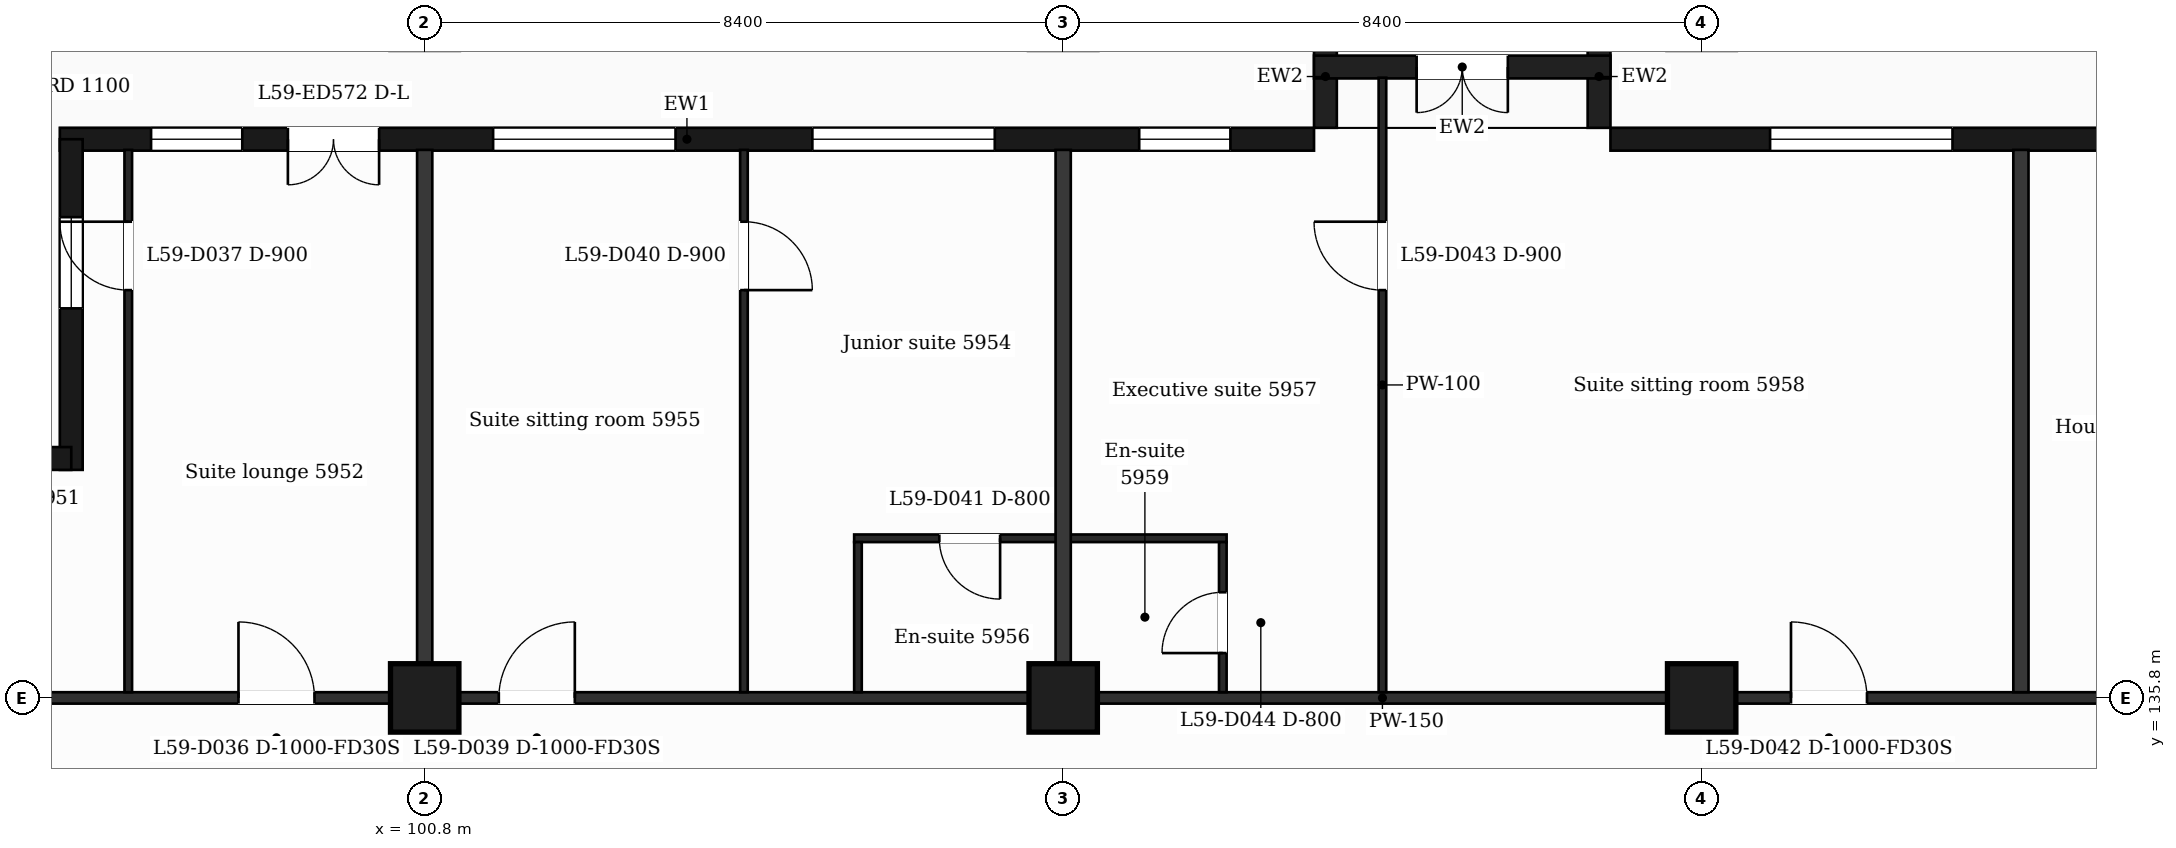
"""IFC4 building model, lengths in metres.
Left out: names, types, materials, properties, quantities, classifications, styles, units other than length and angle.
Written with IfcOpenShell. Run it as: python <this file> out.ifc"""

import sys

from ifc_helpers import new_model, si_unit, direction, frame, frame_2d, origin, origin_2d, place, context, subcontext, project, spatial, rectangle, extrude, element, fill, save


model = new_model("IFC4")
c1 = context("Model", 3, precision=1e-05, world=origin(), true_north=direction((0.0, 1.0)))
c2 = subcontext(c1, "Body", "Model", "MODEL_VIEW")
j1 = project(units=[si_unit("LENGTHUNIT", "METRE"), si_unit("PLANEANGLEUNIT", "RADIAN")], contexts=[c1])
p1 = place(None, origin())
s1 = spatial("IfcSite", under=j1, at=p1, CompositionType="ELEMENT")
p2 = place(p1, origin())
s2 = spatial("IfcBuilding", under=s1, at=p2, CompositionType="ELEMENT")
p3 = place(p2, frame((0.0, 0.0, 242.9)))
s3 = spatial("IfcBuildingStorey", under=s2, at=p3, CompositionType="ELEMENT", Elevation=242.9)
for number, where, z_axis, x_axis in (
    (1, (100.8, 135.8, 0.0), (0.0, 0.0, 1.0), (1.0, 0.0, 0.0)),
    (2, (109.2, 135.8, 0.0), (0.0, 0.0, 1.0), (1.0, 0.0, 0.0)),
    (3, (117.6, 135.8, 0.0), (0.0, 0.0, 1.0), (1.0, 0.0, 0.0)),
):
    element("IfcColumn", number, at=place(p3, frame(where, z_axis=z_axis, x_axis=x_axis)), inside=s3, PredefinedType="COLUMN", context=c2, shape_type="SweptSolid", body=[
        extrude(rectangle(XDim=0.9, YDim=0.9, at=origin_2d()), origin(), (0.0, 0.0, 1.0), 3.7),
    ])
p4 = place(p3, frame((130.65, 143.15, 0.0), z_axis=(0.0, 0.0, 1.0), x_axis=(-1.0, 0.0, 0.0)))
e4 = element("IfcWall", 4, at=p4, inside=s3, PredefinedType="SOLIDWALL", context=c2, shape_type="SweptSolid", body=[
    extrude(rectangle(XDim=14.25, YDim=0.3, at=frame_2d((7.125, 0.0))), origin(), (0.0, 0.0, 1.0), 3.2),
])
p5 = place(p4, frame((1.35, 0.0, 0.9)))
e5 = element("IfcOpeningElement", 5, at=p5, cuts=e4, PredefinedType="OPENING", context=c2, shape_type="SweptSolid", body=[
    extrude(rectangle(XDim=2.4, YDim=2.1, at=frame_2d((1.2, 1.05))), frame((0.0, 0.16, 0.0), z_axis=(0.0, -1.0, 0.0), x_axis=(1.0, 0.0, 0.0)), (0.0, 0.0, 1.0), 0.32),
])
p6 = place(p4, frame((6.15, 0.0, 0.0)))
e6 = element("IfcOpeningElement", 6, at=p6, cuts=e4, PredefinedType="OPENING", context=c2, shape_type="SweptSolid", body=[
    extrude(rectangle(XDim=1.2, YDim=2.4, at=frame_2d((0.6, 1.2))), frame((0.0, 0.16, 0.0), z_axis=(0.0, -1.0, 0.0), x_axis=(1.0, 0.0, 0.0)), (0.0, 0.0, 1.0), 0.32),
])
p7 = place(p4, frame((9.75, 0.0, 0.9)))
e7 = element("IfcOpeningElement", 7, at=p7, cuts=e4, PredefinedType="OPENING", context=c2, shape_type="SweptSolid", body=[
    extrude(rectangle(XDim=2.4, YDim=2.1, at=frame_2d((1.2, 1.05))), frame((0.0, 0.16, 0.0), z_axis=(0.0, -1.0, 0.0), x_axis=(1.0, 0.0, 0.0)), (0.0, 0.0, 1.0), 0.32),
])
p8 = place(p3, frame((112.5, 143.15, 0.0), z_axis=(0.0, 0.0, 1.0), x_axis=(-1.0, 0.0, 0.0)))
e8 = element("IfcWall", 8, at=p8, inside=s3, PredefinedType="SOLIDWALL", context=c2, shape_type="SweptSolid", body=[
    extrude(rectangle(XDim=16.5, YDim=0.3, at=frame_2d((8.25, 0.0))), origin(), (0.0, 0.0, 1.0), 3.2),
])
p9 = place(p8, frame((1.1, 0.0, 0.9)))
e9 = element("IfcOpeningElement", 9, at=p9, cuts=e8, PredefinedType="OPENING", context=c2, shape_type="SweptSolid", body=[
    extrude(rectangle(XDim=1.2, YDim=2.1, at=frame_2d((0.6, 1.05))), frame((0.0, 0.16, 0.0), z_axis=(0.0, -1.0, 0.0), x_axis=(1.0, 0.0, 0.0)), (0.0, 0.0, 1.0), 0.32),
])
p10 = place(p8, frame((4.2, 0.0, 0.9)))
e10 = element("IfcOpeningElement", 10, at=p10, cuts=e8, PredefinedType="OPENING", context=c2, shape_type="SweptSolid", body=[
    extrude(rectangle(XDim=2.4, YDim=2.1, at=frame_2d((1.2, 1.05))), frame((0.0, 0.16, 0.0), z_axis=(0.0, -1.0, 0.0), x_axis=(1.0, 0.0, 0.0)), (0.0, 0.0, 1.0), 0.32),
])
p11 = place(p8, frame((8.4, 0.0, 0.9)))
e11 = element("IfcOpeningElement", 11, at=p11, cuts=e8, PredefinedType="OPENING", context=c2, shape_type="SweptSolid", body=[
    extrude(rectangle(XDim=2.4, YDim=2.1, at=frame_2d((1.2, 1.05))), frame((0.0, 0.16, 0.0), z_axis=(0.0, -1.0, 0.0), x_axis=(1.0, 0.0, 0.0)), (0.0, 0.0, 1.0), 0.32),
])
p12 = place(p8, frame((12.3, 0.0, 0.0)))
e12 = element("IfcOpeningElement", 12, at=p12, cuts=e8, PredefinedType="OPENING", context=c2, shape_type="SweptSolid", body=[
    extrude(rectangle(XDim=1.2, YDim=2.4, at=frame_2d((0.6, 1.2))), frame((0.0, 0.16, 0.0), z_axis=(0.0, -1.0, 0.0), x_axis=(1.0, 0.0, 0.0)), (0.0, 0.0, 1.0), 0.32),
])
p13 = place(p8, frame((14.1, 0.0, 0.9)))
e13 = element("IfcOpeningElement", 13, at=p13, cuts=e8, PredefinedType="OPENING", context=c2, shape_type="SweptSolid", body=[
    extrude(rectangle(XDim=1.2, YDim=2.1, at=frame_2d((0.6, 1.05))), frame((0.0, 0.16, 0.0), z_axis=(0.0, -1.0, 0.0), x_axis=(1.0, 0.0, 0.0)), (0.0, 0.0, 1.0), 0.32),
])
for number, where, z_axis, x_axis in (
    (14, (116.25, 143.3, 0.0), (0.0, 0.0, 1.0), (0.0, 1.0, 0.0)),
    (15, (112.65, 143.3, 0.0), (0.0, 0.0, 1.0), (0.0, 1.0, 0.0)),
):
    element("IfcWall", number, at=place(p3, frame(where, z_axis=z_axis, x_axis=x_axis)), inside=s3, PredefinedType="SOLIDWALL", context=c2, shape_type="SweptSolid", body=[
        extrude(rectangle(XDim=1.35, YDim=0.3, at=frame_2d((0.675, 0.0))), origin(), (0.0, 0.0, 1.0), 3.2),
    ])
p14 = place(p3, frame((116.4, 144.1, 0.0), z_axis=(0.0, 0.0, 1.0), x_axis=(-1.0, 0.0, 0.0)))
e16 = element("IfcWall", 16, at=p14, inside=s3, PredefinedType="SOLIDWALL", context=c2, shape_type="SweptSolid", body=[
    extrude(rectangle(XDim=3.9, YDim=0.3, at=frame_2d((1.95, 0.0))), origin(), (0.0, 0.0, 1.0), 3.2),
])
p15 = place(p14, frame((1.35, 0.0, 0.0)))
e17 = element("IfcOpeningElement", 17, at=p15, cuts=e16, PredefinedType="OPENING", context=c2, shape_type="SweptSolid", body=[
    extrude(rectangle(XDim=1.2, YDim=2.4, at=frame_2d((0.6, 1.2))), frame((0.0, 0.16, 0.0), z_axis=(0.0, -1.0, 0.0), x_axis=(1.0, 0.0, 0.0)), (0.0, 0.0, 1.0), 0.32),
])
p16 = place(p3, frame((96.15, 143.15, 0.0), z_axis=(0.0, 0.0, 1.0), x_axis=(0.0, -1.0, 0.0)))
e18 = element("IfcWall", 18, at=p16, inside=s3, PredefinedType="SOLIDWALL", context=c2, shape_type="SweptSolid", body=[
    extrude(rectangle(XDim=4.35, YDim=0.3, at=frame_2d((2.175, 0.0))), origin(), (0.0, 0.0, 1.0), 3.2),
])
p17 = place(p16, frame((1.025, 0.0, 0.9)))
e19 = element("IfcOpeningElement", 19, at=p17, cuts=e18, PredefinedType="OPENING", context=c2, shape_type="SweptSolid", body=[
    extrude(rectangle(XDim=1.2, YDim=2.1, at=frame_2d((0.6, 1.05))), frame((0.0, 0.16, 0.0), z_axis=(0.0, -1.0, 0.0), x_axis=(1.0, 0.0, 0.0)), (0.0, 0.0, 1.0), 0.32),
])
p18 = place(p3, frame((96.15, 138.95, 0.0), z_axis=(0.0, 0.0, 1.0), x_axis=(-1.0, 0.0, 0.0)))
e20 = element("IfcWall", 20, at=p18, inside=s3, PredefinedType="SOLIDWALL", context=c2, shape_type="SweptSolid", body=[
    extrude(rectangle(XDim=5.104, YDim=0.3, at=frame_2d((2.552, 0.0))), origin(), (0.0, 0.0, 1.0), 3.2),
])
p19 = place(p18, frame((0.725, 0.0, 0.9)))
e21 = element("IfcOpeningElement", 21, at=p19, cuts=e20, PredefinedType="OPENING", context=c2, shape_type="SweptSolid", body=[
    extrude(rectangle(XDim=2.4, YDim=2.1, at=frame_2d((1.2, 1.05))), frame((0.0, 0.16, 0.0), z_axis=(0.0, -1.0, 0.0), x_axis=(1.0, 0.0, 0.0)), (0.0, 0.0, 1.0), 0.32),
])
p20 = place(p3, frame((90.895, 135.8, 0.0), z_axis=(0.0, 0.0, 1.0), x_axis=(1.0, 0.0, 0.0)))
e22 = element("IfcWall", 22, at=p20, inside=s3, PredefinedType="PARTITIONING", context=c2, shape_type="SweptSolid", body=[
    extrude(rectangle(XDim=45.011, YDim=0.15, at=frame_2d((22.505, 0.0))), origin(), (0.0, 0.0, 1.0), 3.2),
])
p21 = place(p20, frame((7.455, 0.0, 0.0)))
e23 = element("IfcOpeningElement", 23, at=p21, cuts=e22, PredefinedType="OPENING", context=c2, shape_type="SweptSolid", body=[
    extrude(rectangle(XDim=1.0, YDim=2.1, at=frame_2d((0.5, 1.05))), frame((0.0, 0.085, 0.0), z_axis=(0.0, -1.0, 0.0), x_axis=(1.0, 0.0, 0.0)), (0.0, 0.0, 1.0), 0.17),
])
p22 = place(p20, frame((10.88, 0.0, 0.0)))
e24 = element("IfcOpeningElement", 24, at=p22, cuts=e22, PredefinedType="OPENING", context=c2, shape_type="SweptSolid", body=[
    extrude(rectangle(XDim=1.0, YDim=2.1, at=frame_2d((0.5, 1.05))), frame((0.0, 0.085, 0.0), z_axis=(0.0, -1.0, 0.0), x_axis=(1.0, 0.0, 0.0)), (0.0, 0.0, 1.0), 0.17),
])
p23 = place(p20, frame((27.88, 0.0, 0.0)))
e25 = element("IfcOpeningElement", 25, at=p23, cuts=e22, PredefinedType="OPENING", context=c2, shape_type="SweptSolid", body=[
    extrude(rectangle(XDim=1.0, YDim=2.1, at=frame_2d((0.5, 1.05))), frame((0.0, 0.085, 0.0), z_axis=(0.0, -1.0, 0.0), x_axis=(1.0, 0.0, 0.0)), (0.0, 0.0, 1.0), 0.17),
])
p24 = place(p20, frame((33.168, 0.0, 0.0)))
e26 = element("IfcOpeningElement", 26, at=p24, cuts=e22, PredefinedType="OPENING", context=c2, shape_type="SweptSolid", body=[
    extrude(rectangle(XDim=0.95, YDim=2.1, at=frame_2d((0.475, 1.05))), frame((0.0, 0.085, 0.0), z_axis=(0.0, -1.0, 0.0), x_axis=(1.0, 0.0, 0.0)), (0.0, 0.0, 1.0), 0.17),
])
p25 = place(p20, frame((36.906, 0.0, 0.0)))
e27 = element("IfcOpeningElement", 27, at=p25, cuts=e22, PredefinedType="OPENING", context=c2, shape_type="SweptSolid", body=[
    extrude(rectangle(XDim=1.0, YDim=2.1, at=frame_2d((0.5, 1.05))), frame((0.0, 0.085, 0.0), z_axis=(0.0, -1.0, 0.0), x_axis=(1.0, 0.0, 0.0)), (0.0, 0.0, 1.0), 0.17),
])
p26 = place(p3, frame((106.45, 137.9, 0.0), z_axis=(0.0, 0.0, 1.0), x_axis=(1.0, 0.0, 0.0)))
e28 = element("IfcWall", 28, at=p26, inside=s3, PredefinedType="PARTITIONING", context=c2, shape_type="SweptSolid", body=[
    extrude(rectangle(XDim=4.9, YDim=0.1, at=frame_2d((2.45, 0.0))), origin(), (0.0, 0.0, 1.0), 3.2),
])
p27 = place(p26, frame((1.12, 0.0, 0.0)))
e29 = element("IfcOpeningElement", 29, at=p27, cuts=e28, PredefinedType="OPENING", context=c2, shape_type="SweptSolid", body=[
    extrude(rectangle(XDim=0.8, YDim=2.1, at=frame_2d((0.4, 1.05))), frame((0.0, 0.06, 0.0), z_axis=(0.0, -1.0, 0.0), x_axis=(1.0, 0.0, 0.0)), (0.0, 0.0, 1.0), 0.12),
])
p28 = place(p3, frame((96.9, 135.875, 0.0), z_axis=(0.0, 0.0, 1.0), x_axis=(0.0, 1.0, 0.0)))
e30 = element("IfcWall", 30, at=p28, inside=s3, PredefinedType="PARTITIONING", context=c2, shape_type="SweptSolid", body=[
    extrude(rectangle(XDim=7.135, YDim=0.1, at=frame_2d((3.567, 0.0))), origin(), (0.0, 0.0, 1.0), 3.2),
])
p29 = place(p28, frame((5.29, 0.0, 0.0)))
e31 = element("IfcOpeningElement", 31, at=p29, cuts=e30, PredefinedType="OPENING", context=c2, shape_type="SweptSolid", body=[
    extrude(rectangle(XDim=0.9, YDim=2.1, at=frame_2d((0.45, 1.05))), frame((0.0, 0.06, 0.0), z_axis=(0.0, -1.0, 0.0), x_axis=(1.0, 0.0, 0.0)), (0.0, 0.0, 1.0), 0.12),
])
p30 = place(p3, frame((100.8, 135.875, 0.0), z_axis=(0.0, 0.0, 1.0), x_axis=(0.0, 1.0, 0.0)))
e32 = element("IfcWall", 32, at=p30, inside=s3, PredefinedType="PARTITIONING", context=c2, shape_type="SweptSolid", body=[
    extrude(rectangle(XDim=7.135, YDim=0.2, at=frame_2d((3.567, 0.0))), origin(), (0.0, 0.0, 1.0), 3.2),
])
p31 = place(p3, frame((105.0, 135.875, 0.0), z_axis=(0.0, 0.0, 1.0), x_axis=(0.0, 1.0, 0.0)))
e33 = element("IfcWall", 33, at=p31, inside=s3, PredefinedType="PARTITIONING", context=c2, shape_type="SweptSolid", body=[
    extrude(rectangle(XDim=7.135, YDim=0.1, at=frame_2d((3.567, 0.0))), origin(), (0.0, 0.0, 1.0), 3.2),
])
p32 = place(p31, frame((5.29, 0.0, 0.0)))
e34 = element("IfcOpeningElement", 34, at=p32, cuts=e33, PredefinedType="OPENING", context=c2, shape_type="SweptSolid", body=[
    extrude(rectangle(XDim=0.9, YDim=2.1, at=frame_2d((0.45, 1.05))), frame((0.0, 0.06, 0.0), z_axis=(0.0, -1.0, 0.0), x_axis=(1.0, 0.0, 0.0)), (0.0, 0.0, 1.0), 0.12),
])
p33 = place(p3, frame((106.5, 135.875, 0.0), z_axis=(0.0, 0.0, 1.0), x_axis=(0.0, 1.0, 0.0)))
e35 = element("IfcWall", 35, at=p33, inside=s3, PredefinedType="PARTITIONING", context=c2, shape_type="SweptSolid", body=[
    extrude(rectangle(XDim=1.975, YDim=0.1, at=frame_2d((0.988, 0.0))), origin(), (0.0, 0.0, 1.0), 3.2),
])
p34 = place(p3, frame((109.2, 135.875, 0.0), z_axis=(0.0, 0.0, 1.0), x_axis=(0.0, 1.0, 0.0)))
e36 = element("IfcWall", 36, at=p34, inside=s3, PredefinedType="PARTITIONING", context=c2, shape_type="SweptSolid", body=[
    extrude(rectangle(XDim=7.135, YDim=0.2, at=frame_2d((3.567, 0.0))), origin(), (0.0, 0.0, 1.0), 3.2),
])
p35 = place(p3, frame((111.3, 135.875, 0.0), z_axis=(0.0, 0.0, 1.0), x_axis=(0.0, 1.0, 0.0)))
e37 = element("IfcWall", 37, at=p35, inside=s3, PredefinedType="PARTITIONING", context=c2, shape_type="SweptSolid", body=[
    extrude(rectangle(XDim=1.975, YDim=0.1, at=frame_2d((0.988, 0.0))), origin(), (0.0, 0.0, 1.0), 3.2),
])
p36 = place(p35, frame((0.515, 0.0, 0.0)))
e38 = element("IfcOpeningElement", 38, at=p36, cuts=e37, PredefinedType="OPENING", context=c2, shape_type="SweptSolid", body=[
    extrude(rectangle(XDim=0.8, YDim=2.1, at=frame_2d((0.4, 1.05))), frame((0.0, 0.06, 0.0), z_axis=(0.0, -1.0, 0.0), x_axis=(1.0, 0.0, 0.0)), (0.0, 0.0, 1.0), 0.12),
])
p37 = place(p3, frame((113.4, 135.875, 0.0), z_axis=(0.0, 0.0, 1.0), x_axis=(0.0, 1.0, 0.0)))
e39 = element("IfcWall", 39, at=p37, inside=s3, PredefinedType="PARTITIONING", context=c2, shape_type="SweptSolid", body=[
    extrude(rectangle(XDim=8.085, YDim=0.1, at=frame_2d((4.042, 0.0))), origin(), (0.0, 0.0, 1.0), 3.2),
])
p38 = place(p37, frame((5.29, 0.0, 0.0)))
e40 = element("IfcOpeningElement", 40, at=p38, cuts=e39, PredefinedType="OPENING", context=c2, shape_type="SweptSolid", body=[
    extrude(rectangle(XDim=0.9, YDim=2.1, at=frame_2d((0.45, 1.05))), frame((0.0, 0.06, 0.0), z_axis=(0.0, -1.0, 0.0), x_axis=(1.0, 0.0, 0.0)), (0.0, 0.0, 1.0), 0.12),
])
p39 = place(p3, frame((121.8, 135.875, 0.0), z_axis=(0.0, 0.0, 1.0), x_axis=(0.0, 1.0, 0.0)))
e41 = element("IfcWall", 41, at=p39, inside=s3, PredefinedType="PARTITIONING", context=c2, shape_type="SweptSolid", body=[
    extrude(rectangle(XDim=7.135, YDim=0.2, at=frame_2d((3.567, 0.0))), origin(), (0.0, 0.0, 1.0), 3.2),
])
p40 = place(p7, origin())
e42 = element("IfcWindow", 42, at=p40, inside=s3, PartitioningType="SINGLE_PANEL", PredefinedType="WINDOW", context=c2, shape_type="SweptSolid", body=[
    extrude(rectangle(XDim=2.4, YDim=2.1, at=frame_2d((1.2, 1.05))), frame((0.0, 0.03, 0.0), z_axis=(0.0, -1.0, 0.0), x_axis=(1.0, 0.0, 0.0)), (0.0, 0.0, 1.0), 0.06),
])
fill(e7, e42)
p41 = place(p9, origin())
e43 = element("IfcWindow", 43, at=p41, inside=s3, PartitioningType="SINGLE_PANEL", PredefinedType="WINDOW", context=c2, shape_type="SweptSolid", body=[
    extrude(rectangle(XDim=1.2, YDim=2.1, at=frame_2d((0.6, 1.05))), frame((0.0, 0.03, 0.0), z_axis=(0.0, -1.0, 0.0), x_axis=(1.0, 0.0, 0.0)), (0.0, 0.0, 1.0), 0.06),
])
fill(e9, e43)
p42 = place(p10, origin())
e44 = element("IfcWindow", 44, at=p42, inside=s3, PartitioningType="SINGLE_PANEL", PredefinedType="WINDOW", context=c2, shape_type="SweptSolid", body=[
    extrude(rectangle(XDim=2.4, YDim=2.1, at=frame_2d((1.2, 1.05))), frame((0.0, 0.03, 0.0), z_axis=(0.0, -1.0, 0.0), x_axis=(1.0, 0.0, 0.0)), (0.0, 0.0, 1.0), 0.06),
])
fill(e10, e44)
p43 = place(p11, origin())
e45 = element("IfcWindow", 45, at=p43, inside=s3, PartitioningType="SINGLE_PANEL", PredefinedType="WINDOW", context=c2, shape_type="SweptSolid", body=[
    extrude(rectangle(XDim=2.4, YDim=2.1, at=frame_2d((1.2, 1.05))), frame((0.0, 0.03, 0.0), z_axis=(0.0, -1.0, 0.0), x_axis=(1.0, 0.0, 0.0)), (0.0, 0.0, 1.0), 0.06),
])
fill(e11, e45)
p44 = place(p12, origin())
e46 = element("IfcDoor", 46, at=p44, inside=s3, OperationType="DOUBLE_DOOR_SINGLE_SWING", PredefinedType="DOOR", context=c2, shape_type="SweptSolid", body=[
    extrude(rectangle(XDim=1.2, YDim=2.4, at=frame_2d((0.6, 1.2))), frame((0.0, 0.025, 0.0), z_axis=(0.0, -1.0, 0.0), x_axis=(1.0, 0.0, 0.0)), (0.0, 0.0, 1.0), 0.05),
])
fill(e12, e46)
p45 = place(p13, origin())
e47 = element("IfcWindow", 47, at=p45, inside=s3, PartitioningType="SINGLE_PANEL", PredefinedType="WINDOW", context=c2, shape_type="SweptSolid", body=[
    extrude(rectangle(XDim=1.2, YDim=2.1, at=frame_2d((0.6, 1.05))), frame((0.0, 0.03, 0.0), z_axis=(0.0, -1.0, 0.0), x_axis=(1.0, 0.0, 0.0)), (0.0, 0.0, 1.0), 0.06),
])
fill(e13, e47)
p46 = place(p15, origin())
e48 = element("IfcDoor", 48, at=p46, inside=s3, OperationType="DOUBLE_DOOR_SINGLE_SWING", PredefinedType="DOOR", context=c2, shape_type="SweptSolid", body=[
    extrude(rectangle(XDim=1.2, YDim=2.4, at=frame_2d((0.6, 1.2))), frame((0.0, 0.025, 0.0), z_axis=(0.0, -1.0, 0.0), x_axis=(1.0, 0.0, 0.0)), (0.0, 0.0, 1.0), 0.05),
])
fill(e17, e48)
p47 = place(p17, origin())
e49 = element("IfcWindow", 49, at=p47, inside=s3, PartitioningType="SINGLE_PANEL", PredefinedType="WINDOW", context=c2, shape_type="SweptSolid", body=[
    extrude(rectangle(XDim=1.2, YDim=2.1, at=frame_2d((0.6, 1.05))), frame((0.0, 0.03, 0.0), z_axis=(0.0, -1.0, 0.0), x_axis=(1.0, 0.0, 0.0)), (0.0, 0.0, 1.0), 0.06),
])
fill(e19, e49)
p48 = place(p21, origin())
e50 = element("IfcDoor", 50, at=p48, inside=s3, OperationType="SINGLE_SWING_LEFT", PredefinedType="DOOR", context=c2, shape_type="SweptSolid", body=[
    extrude(rectangle(XDim=1.0, YDim=2.1, at=frame_2d((0.5, 1.05))), frame((0.0, 0.025, 0.0), z_axis=(0.0, -1.0, 0.0), x_axis=(1.0, 0.0, 0.0)), (0.0, 0.0, 1.0), 0.05),
])
fill(e23, e50)
p49 = place(p29, origin())
e51 = element("IfcDoor", 51, at=p49, inside=s3, OperationType="SINGLE_SWING_RIGHT", PredefinedType="DOOR", context=c2, shape_type="SweptSolid", body=[
    extrude(rectangle(XDim=0.9, YDim=2.1, at=frame_2d((0.45, 1.05))), frame((0.0, 0.025, 0.0), z_axis=(0.0, -1.0, 0.0), x_axis=(1.0, 0.0, 0.0)), (0.0, 0.0, 1.0), 0.05),
])
fill(e31, e51)
p50 = place(p22, origin())
e52 = element("IfcDoor", 52, at=p50, inside=s3, OperationType="SINGLE_SWING_RIGHT", PredefinedType="DOOR", context=c2, shape_type="SweptSolid", body=[
    extrude(rectangle(XDim=1.0, YDim=2.1, at=frame_2d((0.5, 1.05))), frame((0.0, 0.025, 0.0), z_axis=(0.0, -1.0, 0.0), x_axis=(1.0, 0.0, 0.0)), (0.0, 0.0, 1.0), 0.05),
])
fill(e24, e52)
p51 = place(p32, origin())
e53 = element("IfcDoor", 53, at=p51, inside=s3, OperationType="SINGLE_SWING_LEFT", PredefinedType="DOOR", context=c2, shape_type="SweptSolid", body=[
    extrude(rectangle(XDim=0.9, YDim=2.1, at=frame_2d((0.45, 1.05))), frame((0.0, 0.025, 0.0), z_axis=(0.0, -1.0, 0.0), x_axis=(1.0, 0.0, 0.0)), (0.0, 0.0, 1.0), 0.05),
])
fill(e34, e53)
p52 = place(p27, origin())
e54 = element("IfcDoor", 54, at=p52, inside=s3, OperationType="SINGLE_SWING_RIGHT", PredefinedType="DOOR", context=c2, shape_type="SweptSolid", body=[
    extrude(rectangle(XDim=0.8, YDim=2.1, at=frame_2d((0.4, 1.05))), frame((0.0, 0.025, 0.0), z_axis=(0.0, -1.0, 0.0), x_axis=(1.0, 0.0, 0.0)), (0.0, 0.0, 1.0), 0.05),
])
fill(e29, e54)
p53 = place(p23, origin())
e55 = element("IfcDoor", 55, at=p53, inside=s3, OperationType="SINGLE_SWING_LEFT", PredefinedType="DOOR", context=c2, shape_type="SweptSolid", body=[
    extrude(rectangle(XDim=1.0, YDim=2.1, at=frame_2d((0.5, 1.05))), frame((0.0, 0.025, 0.0), z_axis=(0.0, -1.0, 0.0), x_axis=(1.0, 0.0, 0.0)), (0.0, 0.0, 1.0), 0.05),
])
fill(e25, e55)
p54 = place(p38, origin())
e56 = element("IfcDoor", 56, at=p54, inside=s3, OperationType="SINGLE_SWING_RIGHT", PredefinedType="DOOR", context=c2, shape_type="SweptSolid", body=[
    extrude(rectangle(XDim=0.9, YDim=2.1, at=frame_2d((0.45, 1.05))), frame((0.0, 0.025, 0.0), z_axis=(0.0, -1.0, 0.0), x_axis=(1.0, 0.0, 0.0)), (0.0, 0.0, 1.0), 0.05),
])
fill(e40, e56)
p55 = place(p36, origin())
e57 = element("IfcDoor", 57, at=p55, inside=s3, OperationType="SINGLE_SWING_LEFT", PredefinedType="DOOR", context=c2, shape_type="SweptSolid", body=[
    extrude(rectangle(XDim=0.8, YDim=2.1, at=frame_2d((0.4, 1.05))), frame((0.0, 0.025, 0.0), z_axis=(0.0, -1.0, 0.0), x_axis=(1.0, 0.0, 0.0)), (0.0, 0.0, 1.0), 0.05),
])
fill(e38, e57)
save(model, sys.argv[1])
